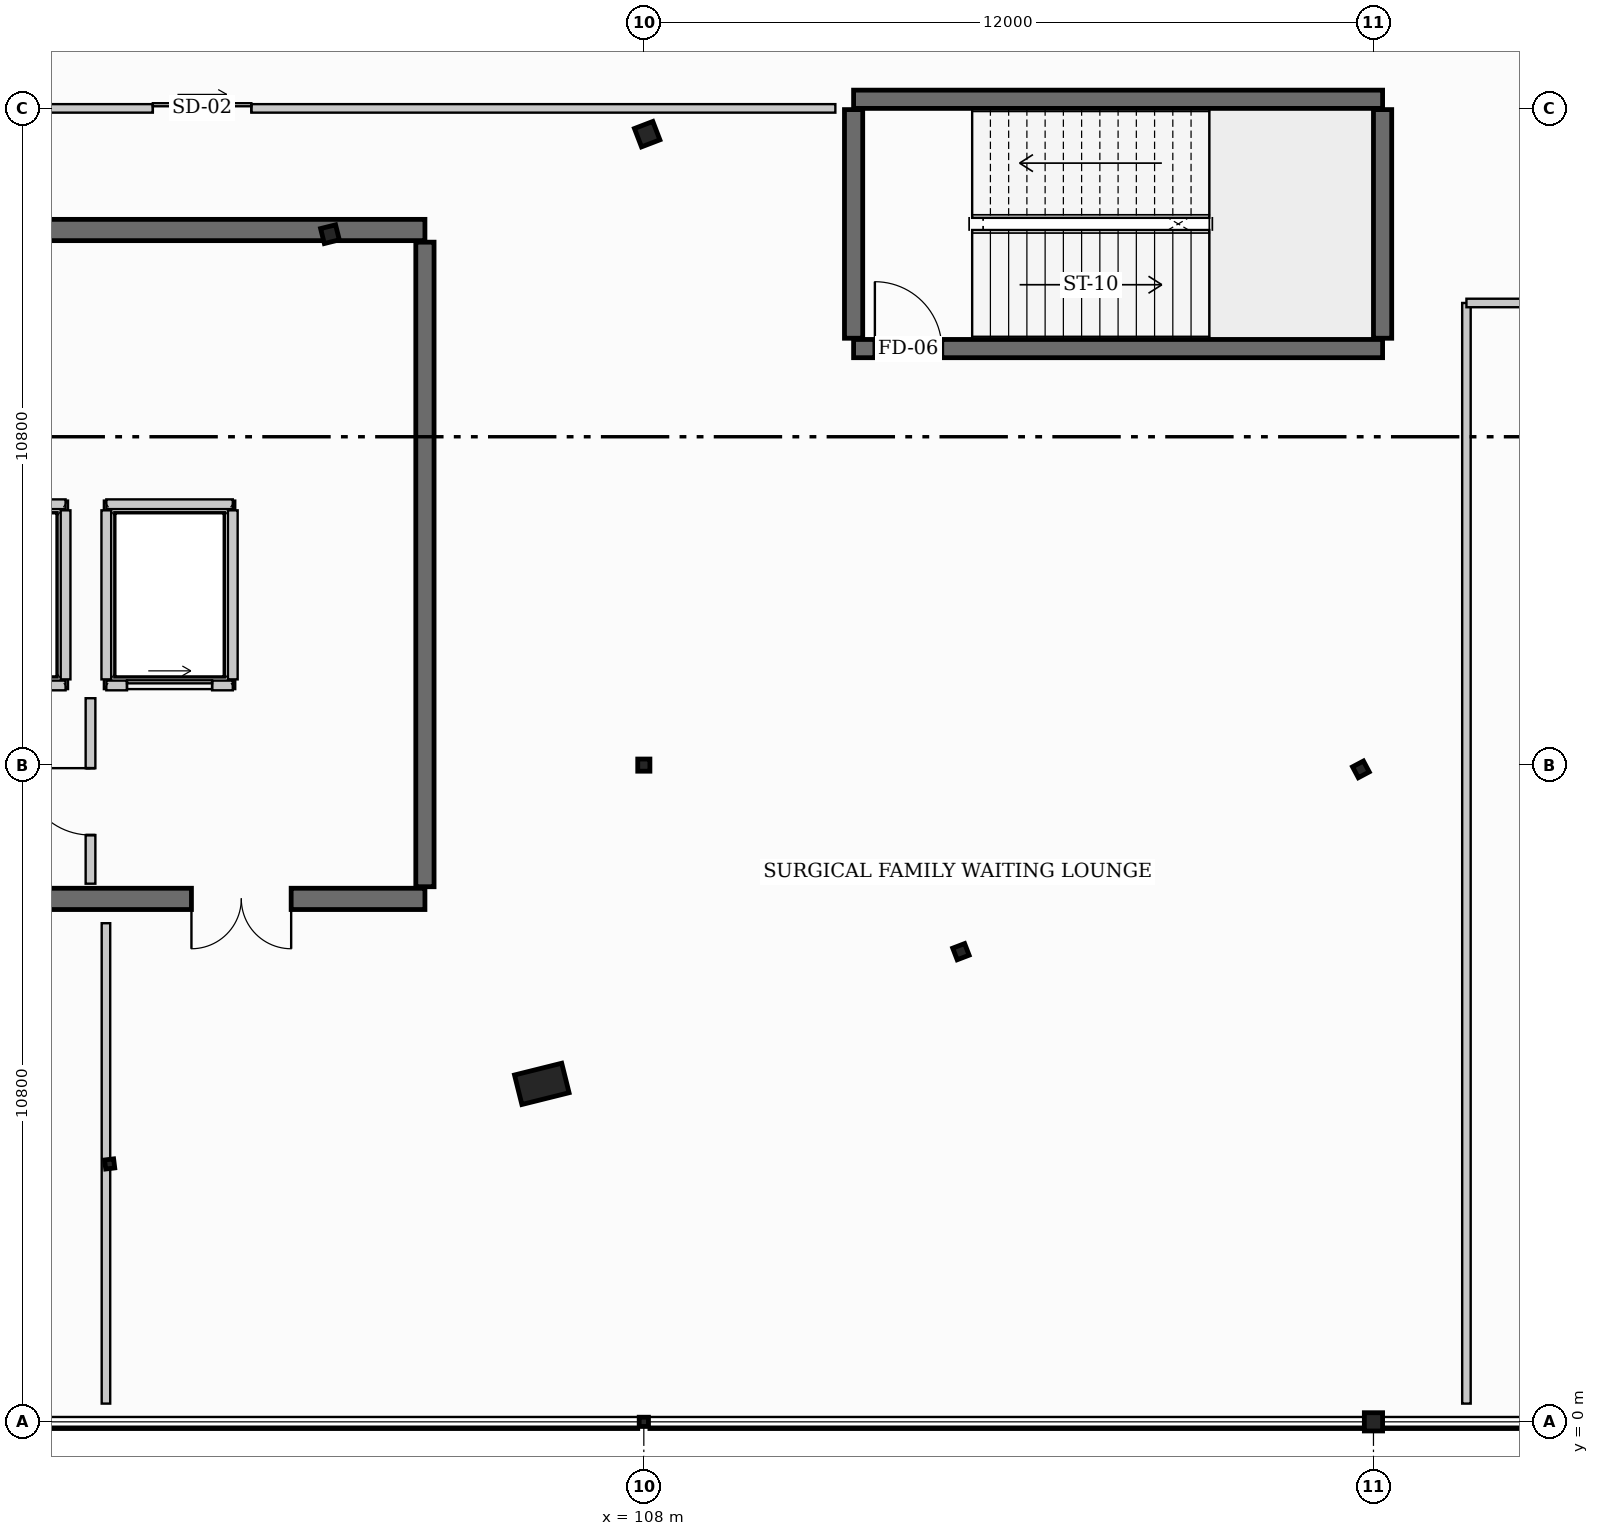
"""IFC4 building model, lengths in metres.
Left out: names, types, materials, properties, quantities, classifications, styles, units other than length and angle.
Written with IfcOpenShell. Run it as: python <this file> out.ifc"""

import sys

from ifc_helpers import new_model, si_unit, direction, frame, frame_2d, origin, origin_2d, place, context, subcontext, project, spatial, rectangle, hollow_rectangle, hollow_circle, i_section, extrude, element, fill, save


model = new_model("IFC4")
c1 = context("Model", 3, precision=1e-05, world=origin(), true_north=direction((0.0, 1.0)))
c2 = subcontext(c1, "Body", "Model", "MODEL_VIEW")
j1 = project(units=[si_unit("LENGTHUNIT", "METRE"), si_unit("PLANEANGLEUNIT", "RADIAN")], contexts=[c1])
p1 = place(None, origin())
s1 = spatial("IfcSite", under=j1, at=p1, CompositionType="ELEMENT")
p2 = place(p1, origin())
s2 = spatial("IfcBuilding", under=s1, at=p2, CompositionType="ELEMENT")
p3 = place(p2, frame((0.0, 0.0, 9.6)))
s3 = spatial("IfcBuildingStorey", under=s2, at=p3, CompositionType="ELEMENT", Elevation=9.6)
p4 = place(p3, frame((108.0, 0.0, 0.0), z_axis=(0.0, 0.0, 1.0), x_axis=(0.0, 1.0, 0.0)))
e1 = element("IfcColumn", 1, at=p4, inside=s3, PredefinedType="COLUMN", context=c2, shape_type="SweptSolid", body=[
    extrude(i_section(OverallWidth=0.152, OverallDepth=0.152, WebThickness=0.006, FlangeThickness=0.007, at=origin_2d()), origin(), (0.0, 0.0, 1.0), 4.8),
])
p5 = place(p3, frame((108.0, 10.8, 0.0), z_axis=(0.0, 0.0, 1.0), x_axis=(0.0, 1.0, 0.0)))
e2 = element("IfcColumn", 2, at=p5, inside=s3, PredefinedType="COLUMN", context=c2, shape_type="SweptSolid", body=[
    extrude(hollow_rectangle(XDim=0.2, YDim=0.2, WallThickness=0.01, at=origin_2d()), origin(), (0.0, 0.0, 1.0), 4.8),
])
p6 = place(p3, frame((120.0, 0.0, 0.0), z_axis=(0.0, 0.0, 1.0), x_axis=(1.0, 0.0, 0.0)))
e3 = element("IfcColumn", 3, at=p6, inside=s3, PredefinedType="COLUMN", context=c2, shape_type="SweptSolid", body=[
    extrude(hollow_rectangle(XDim=0.3, YDim=0.3, WallThickness=0.012, at=origin_2d()), origin(), (0.0, 0.0, 1.0), 4.8),
])
p7 = place(p3, frame((99.215, 4.241, 0.0), z_axis=(0.0, 0.0, 1.0), x_axis=(-0.121869343405, 0.992546151641, 0.0)))
e4 = element("IfcColumn", 4, at=p7, inside=s3, PredefinedType="COLUMN", context=c2, shape_type="SweptSolid", body=[
    extrude(hollow_rectangle(XDim=0.15, YDim=0.15, WallThickness=0.008, at=origin_2d()), origin(), (0.0, 0.0, 1.0), 4.8),
])
p8 = place(p3, frame((106.322, 5.558, 0.0), z_axis=(0.0, 0.0, 1.0), x_axis=(-0.2419218956, 0.970295726276, 0.0)))
e5 = element("IfcColumn", 5, at=p8, inside=s3, PredefinedType="PILASTER", context=c2, shape_type="SweptSolid", body=[
    extrude(rectangle(XDim=0.5, YDim=0.8, at=origin_2d()), origin(), (0.0, 0.0, 1.0), 4.8),
])
p9 = place(p3, frame((102.838, 19.531, 0.0), z_axis=(0.0, 0.0, 1.0), x_axis=(-0.2419218956, 0.970295726276, 0.0)))
e6 = element("IfcColumn", 6, at=p9, inside=s3, PredefinedType="COLUMN", context=c2, shape_type="SweptSolid", body=[
    extrude(i_section(OverallWidth=0.254, OverallDepth=0.254, WebThickness=0.009, FlangeThickness=0.014, at=origin_2d()), origin(), (0.0, 0.0, 1.0), 4.8),
])
p10 = place(p3, frame((113.215, 7.732, 0.0), z_axis=(0.0, 0.0, 1.0), x_axis=(-0.358367949545, 0.933580426497, 0.0)))
e7 = element("IfcColumn", 7, at=p10, inside=s3, PredefinedType="COLUMN", context=c2, shape_type="SweptSolid", body=[
    extrude(i_section(OverallWidth=0.205, OverallDepth=0.21, WebThickness=0.009, FlangeThickness=0.014, at=origin_2d()), origin(), (0.0, 0.0, 1.0), 4.8),
])
p11 = place(p3, frame((108.055, 21.176, 0.0), z_axis=(0.0, 0.0, 1.0), x_axis=(-0.358367949545, 0.933580426497, 0.0)))
e8 = element("IfcColumn", 8, at=p11, inside=s3, PredefinedType="COLUMN", context=c2, shape_type="SweptSolid", body=[
    extrude(hollow_circle(Radius=0.162, WallThickness=0.013, at=origin_2d()), origin(), (0.0, 0.0, 1.0), 4.8),
])
p12 = place(p3, frame((119.793, 10.73, 0.0), z_axis=(0.0, 0.0, 1.0), x_axis=(-0.469471562786, 0.882947592859, 0.0)))
e9 = element("IfcColumn", 9, at=p12, inside=s3, PredefinedType="COLUMN", context=c2, shape_type="SweptSolid", body=[
    extrude(i_section(OverallWidth=0.203, OverallDepth=0.203, WebThickness=0.007, FlangeThickness=0.011, at=origin_2d()), origin(), (0.0, 0.0, 1.0), 4.8),
])
p13 = place(p3, frame((84.0, 19.6, 0.0), z_axis=(0.0, 0.0, 1.0), x_axis=(1.0, 0.0, 0.0)))
e10 = element("IfcWall", 10, at=p13, inside=s3, PredefinedType="SHEAR", context=c2, shape_type="SweptSolid", body=[
    extrude(rectangle(XDim=20.4, YDim=0.35, at=frame_2d((10.2, 0.0))), origin(), (0.0, 0.0, 1.0), 4.8),
])
p14 = place(p3, frame((104.4, 8.6, 0.0), z_axis=(0.0, 0.0, 1.0), x_axis=(-1.0, 0.0, 0.0)))
e11 = element("IfcWall", 11, at=p14, inside=s3, PredefinedType="SHEAR", context=c2, shape_type="SweptSolid", body=[
    extrude(rectangle(XDim=20.4, YDim=0.35, at=frame_2d((10.2, 0.0))), origin(), (0.0, 0.0, 1.0), 4.8),
])
p15 = place(p14, frame((2.2, 0.0, 0.0)))
e12 = element("IfcOpeningElement", 12, at=p15, cuts=e11, PredefinedType="OPENING", context=c2, shape_type="SweptSolid", body=[
    extrude(rectangle(XDim=1.64, YDim=2.2, at=frame_2d((0.82, 1.1))), frame((0.0, 0.185, 0.0), z_axis=(0.0, -1.0, 0.0), x_axis=(1.0, 0.0, 0.0)), (0.0, 0.0, 1.0), 0.37),
])
p16 = place(p14, frame((13.0, 0.0, 0.0)))
e13 = element("IfcOpeningElement", 13, at=p16, cuts=e11, PredefinedType="OPENING", context=c2, shape_type="SweptSolid", body=[
    extrude(rectangle(XDim=1.52, YDim=2.16, at=frame_2d((0.76, 1.08))), frame((0.0, 0.185, 0.0), z_axis=(0.0, -1.0, 0.0), x_axis=(1.0, 0.0, 0.0)), (0.0, 0.0, 1.0), 0.37),
])
p17 = place(p3, frame((104.4, 19.4, 0.0), z_axis=(0.0, 0.0, 1.0), x_axis=(0.0, -1.0, 0.0)))
e14 = element("IfcWall", 14, at=p17, inside=s3, PredefinedType="SHEAR", context=c2, shape_type="SweptSolid", body=[
    extrude(rectangle(XDim=10.6, YDim=0.3, at=frame_2d((5.3, 0.0))), origin(), (0.0, 0.0, 1.0), 4.8),
])
p18 = place(p3, frame((111.45, 17.65, 0.0), z_axis=(0.0, 0.0, 1.0), x_axis=(1.0, 0.0, 0.0)))
e15 = element("IfcWall", 15, at=p18, inside=s3, PredefinedType="SHEAR", context=c2, shape_type="SweptSolid", body=[
    extrude(rectangle(XDim=8.7, YDim=0.3, at=frame_2d((4.35, 0.0))), origin(), (0.0, 0.0, 1.0), 4.8),
])
p19 = place(p18, frame((0.35, 0.0, 0.0)))
e16 = element("IfcOpeningElement", 16, at=p19, cuts=e15, PredefinedType="OPENING", context=c2, shape_type="SweptSolid", body=[
    extrude(rectangle(XDim=1.1, YDim=2.15, at=frame_2d((0.55, 1.075))), frame((0.0, 0.16, 0.0), z_axis=(0.0, -1.0, 0.0), x_axis=(1.0, 0.0, 0.0)), (0.0, 0.0, 1.0), 0.32),
])
p20 = place(p3, frame((120.15, 21.75, 0.0), z_axis=(0.0, 0.0, 1.0), x_axis=(-1.0, 0.0, 0.0)))
e17 = element("IfcWall", 17, at=p20, inside=s3, PredefinedType="SHEAR", context=c2, shape_type="SweptSolid", body=[
    extrude(rectangle(XDim=8.7, YDim=0.3, at=frame_2d((4.35, 0.0))), origin(), (0.0, 0.0, 1.0), 4.8),
])
for number, where, z_axis, x_axis in (
    (18, (111.45, 17.82, 0.0), (0.0, 0.0, 1.0), (0.0, 1.0, 0.0)),
    (19, (120.15, 17.82, 0.0), (0.0, 0.0, 1.0), (0.0, 1.0, 0.0)),
):
    element("IfcWall", number, at=place(p3, frame(where, z_axis=z_axis, x_axis=x_axis)), inside=s3, PredefinedType="SHEAR", context=c2, shape_type="SweptSolid", body=[
        extrude(rectangle(XDim=3.76, YDim=0.3, at=frame_2d((1.88, 0.0))), origin(), (0.0, 0.0, 1.0), 4.8),
    ])
p21 = place(p3, frame((96.41, 12.11, 0.0), z_axis=(0.0, 0.0, 1.0), x_axis=(1.0, 0.0, 0.0)))
e20 = element("IfcWall", 20, at=p21, inside=s3, PredefinedType="PARTITIONING", context=c2, shape_type="SweptSolid", body=[
    extrude(rectangle(XDim=2.08, YDim=0.16, at=frame_2d((1.04, 0.0))), origin(), (0.0, 0.0, 1.0), 4.43),
])
p22 = place(p21, frame((0.34, 0.0, 0.0)))
e21 = element("IfcOpeningElement", 21, at=p22, cuts=e20, PredefinedType="OPENING", context=c2, shape_type="SweptSolid", body=[
    extrude(rectangle(XDim=1.4, YDim=2.2, at=frame_2d((0.7, 1.1))), frame((0.0, 0.09, 0.0), z_axis=(0.0, -1.0, 0.0), x_axis=(1.0, 0.0, 0.0)), (0.0, 0.0, 1.0), 0.18),
])
p23 = place(p3, frame((98.49, 15.09, 0.0), z_axis=(0.0, 0.0, 1.0), x_axis=(-1.0, 0.0, 0.0)))
e22 = element("IfcWall", 22, at=p23, inside=s3, PredefinedType="PARTITIONING", context=c2, shape_type="SweptSolid", body=[
    extrude(rectangle(XDim=2.08, YDim=0.16, at=frame_2d((1.04, 0.0))), origin(), (0.0, 0.0, 1.0), 4.43),
])
p24 = place(p3, frame((98.49, 12.21, 0.0), z_axis=(0.0, 0.0, 1.0), x_axis=(0.0, 1.0, 0.0)))
e23 = element("IfcWall", 23, at=p24, inside=s3, PredefinedType="PARTITIONING", context=c2, shape_type="SweptSolid", body=[
    extrude(rectangle(XDim=2.78, YDim=0.16, at=frame_2d((1.39, 0.0))), origin(), (0.0, 0.0, 1.0), 4.43),
])
p25 = place(p3, frame((99.16, 12.11, 0.0), z_axis=(0.0, 0.0, 1.0), x_axis=(1.0, 0.0, 0.0)))
e24 = element("IfcWall", 24, at=p25, inside=s3, PredefinedType="PARTITIONING", context=c2, shape_type="SweptSolid", body=[
    extrude(rectangle(XDim=2.08, YDim=0.16, at=frame_2d((1.04, 0.0))), origin(), (0.0, 0.0, 1.0), 4.43),
])
p26 = place(p25, frame((0.34, 0.0, 0.0)))
e25 = element("IfcOpeningElement", 25, at=p26, cuts=e24, PredefinedType="OPENING", context=c2, shape_type="SweptSolid", body=[
    extrude(rectangle(XDim=1.4, YDim=2.2, at=frame_2d((0.7, 1.1))), frame((0.0, 0.09, 0.0), z_axis=(0.0, -1.0, 0.0), x_axis=(1.0, 0.0, 0.0)), (0.0, 0.0, 1.0), 0.18),
])
p27 = place(p3, frame((101.24, 15.09, 0.0), z_axis=(0.0, 0.0, 1.0), x_axis=(-1.0, 0.0, 0.0)))
e26 = element("IfcWall", 26, at=p27, inside=s3, PredefinedType="PARTITIONING", context=c2, shape_type="SweptSolid", body=[
    extrude(rectangle(XDim=2.08, YDim=0.16, at=frame_2d((1.04, 0.0))), origin(), (0.0, 0.0, 1.0), 4.43),
])
for number, where, z_axis, x_axis in (
    (27, (99.16, 14.99, 0.0), (0.0, 0.0, 1.0), (0.0, -1.0, 0.0)),
    (28, (101.24, 12.21, 0.0), (0.0, 0.0, 1.0), (0.0, 1.0, 0.0)),
):
    element("IfcWall", number, at=place(p3, frame(where, z_axis=z_axis, x_axis=x_axis)), inside=s3, PredefinedType="PARTITIONING", context=c2, shape_type="SweptSolid", body=[
        extrude(rectangle(XDim=2.78, YDim=0.16, at=frame_2d((1.39, 0.0))), origin(), (0.0, 0.0, 1.0), 4.43),
    ])
p28 = place(p3, frame((98.9, 8.85, 0.0), z_axis=(0.0, 0.0, 1.0), x_axis=(0.0, 1.0, 0.0)))
e29 = element("IfcWall", 29, at=p28, inside=s3, PredefinedType="PARTITIONING", context=c2, shape_type="SweptSolid", body=[
    extrude(rectangle(XDim=3.05, YDim=0.16, at=frame_2d((1.525, 0.0))), origin(), (0.0, 0.0, 1.0), 3.961),
])
p29 = place(p28, frame((0.8, 0.0, 0.0)))
e30 = element("IfcOpeningElement", 30, at=p29, cuts=e29, PredefinedType="OPENING", context=c2, shape_type="SweptSolid", body=[
    extrude(rectangle(XDim=1.1, YDim=2.15, at=frame_2d((0.55, 1.075))), frame((0.0, 0.09, 0.0), z_axis=(0.0, -1.0, 0.0), x_axis=(1.0, 0.0, 0.0)), (0.0, 0.0, 1.0), 0.18),
])
p30 = place(p3, frame((99.154, 0.3, 0.0), z_axis=(0.0, 0.0, 1.0), x_axis=(0.0, 1.0, 0.0)))
e31 = element("IfcWall", 31, at=p30, inside=s3, PredefinedType="PARTITIONING", context=c2, shape_type="SweptSolid", body=[
    extrude(rectangle(XDim=7.9, YDim=0.14, at=frame_2d((3.95, 0.0))), origin(), (0.0, 0.0, 1.0), 4.065),
])
p31 = place(p3, frame((121.529, 0.3, 0.0), z_axis=(0.0, 0.0, 1.0), x_axis=(0.0, 1.0, 0.0)))
e32 = element("IfcWall", 32, at=p31, inside=s3, PredefinedType="PARTITIONING", context=c2, shape_type="SweptSolid", body=[
    extrude(rectangle(XDim=18.1, YDim=0.14, at=frame_2d((9.05, 0.0))), origin(), (0.0, 0.0, 1.0), 4.012),
])
p32 = place(p3, frame((121.529, 18.4, 0.0), z_axis=(0.0, 0.0, 1.0), x_axis=(1.0, 0.0, 0.0)))
e33 = element("IfcWall", 33, at=p32, inside=s3, PredefinedType="PARTITIONING", context=c2, shape_type="SweptSolid", body=[
    extrude(rectangle(XDim=10.171, YDim=0.14, at=frame_2d((5.085, 0.0))), origin(), (0.0, 0.0, 1.0), 3.465),
])
p33 = place(p32, frame((4.435, 0.0, 0.0)))
e34 = element("IfcOpeningElement", 34, at=p33, cuts=e33, PredefinedType="OPENING", context=c2, shape_type="SweptSolid", body=[
    extrude(rectangle(XDim=0.9, YDim=2.1, at=frame_2d((0.45, 1.05))), frame((0.0, 0.08, 0.0), z_axis=(0.0, -1.0, 0.0), x_axis=(1.0, 0.0, 0.0)), (0.0, 0.0, 1.0), 0.16),
])
p34 = place(p3, frame((90.0, 21.6, 0.0), z_axis=(0.0, 0.0, 1.0), x_axis=(1.0, 0.0, 0.0)))
e35 = element("IfcWall", 35, at=p34, inside=s3, PredefinedType="PARTITIONING", context=c2, shape_type="SweptSolid", body=[
    extrude(rectangle(XDim=21.15, YDim=0.14, at=frame_2d((10.575, 0.0))), origin(), (0.0, 0.0, 1.0), 4.012),
])
p35 = place(p34, frame((9.925, 0.0, 0.0)))
e36 = element("IfcOpeningElement", 36, at=p35, cuts=e35, PredefinedType="OPENING", context=c2, shape_type="SweptSolid", body=[
    extrude(rectangle(XDim=1.62, YDim=2.3, at=frame_2d((0.81, 1.15))), frame((0.0, 0.08, 0.0), z_axis=(0.0, -1.0, 0.0), x_axis=(1.0, 0.0, 0.0)), (0.0, 0.0, 1.0), 0.16),
])
p36 = place(p26, origin())
e37 = element("IfcDoor", 37, at=p36, inside=s3, OperationType="SLIDING_TO_RIGHT", PredefinedType="DOOR", context=c2, shape_type="SweptSolid", body=[
    extrude(rectangle(XDim=1.4, YDim=2.2, at=frame_2d((0.7, 1.1))), frame((0.0, 0.025, 0.0), z_axis=(0.0, -1.0, 0.0), x_axis=(1.0, 0.0, 0.0)), (0.0, 0.0, 1.0), 0.05),
])
fill(e25, e37)
p37 = place(p19, origin())
e38 = element("IfcDoor", 38, at=p37, inside=s3, OperationType="SINGLE_SWING_LEFT", PredefinedType="DOOR", context=c2, shape_type="SweptSolid", body=[
    extrude(rectangle(XDim=1.1, YDim=2.15, at=frame_2d((0.55, 1.075))), frame((0.0, 0.025, 0.0), z_axis=(0.0, -1.0, 0.0), x_axis=(1.0, 0.0, 0.0)), (0.0, 0.0, 1.0), 0.05),
])
fill(e16, e38)
p38 = place(p15, origin())
e39 = element("IfcDoor", 39, at=p38, inside=s3, OperationType="DOUBLE_DOOR_SINGLE_SWING", PredefinedType="DOOR", context=c2, shape_type="SweptSolid", body=[
    extrude(rectangle(XDim=1.64, YDim=2.2, at=frame_2d((0.82, 1.1))), frame((0.0, 0.025, 0.0), z_axis=(0.0, -1.0, 0.0), x_axis=(1.0, 0.0, 0.0)), (0.0, 0.0, 1.0), 0.05),
])
fill(e12, e39)
p39 = place(p29, origin())
e40 = element("IfcDoor", 40, at=p39, inside=s3, OperationType="SINGLE_SWING_RIGHT", PredefinedType="DOOR", context=c2, shape_type="SweptSolid", body=[
    extrude(rectangle(XDim=1.1, YDim=2.15, at=frame_2d((0.55, 1.075))), frame((0.0, 0.025, 0.0), z_axis=(0.0, -1.0, 0.0), x_axis=(1.0, 0.0, 0.0)), (0.0, 0.0, 1.0), 0.05),
])
fill(e30, e40)
p40 = place(p35, origin())
e41 = element("IfcDoor", 41, at=p40, inside=s3, OperationType="SLIDING_TO_RIGHT", PredefinedType="DOOR", context=c2, shape_type="SweptSolid", body=[
    extrude(rectangle(XDim=1.62, YDim=2.3, at=frame_2d((0.81, 1.15))), frame((0.0, 0.025, 0.0), z_axis=(0.0, -1.0, 0.0), x_axis=(1.0, 0.0, 0.0)), (0.0, 0.0, 1.0), 0.05),
])
fill(e36, e41)
save(model, sys.argv[1])
